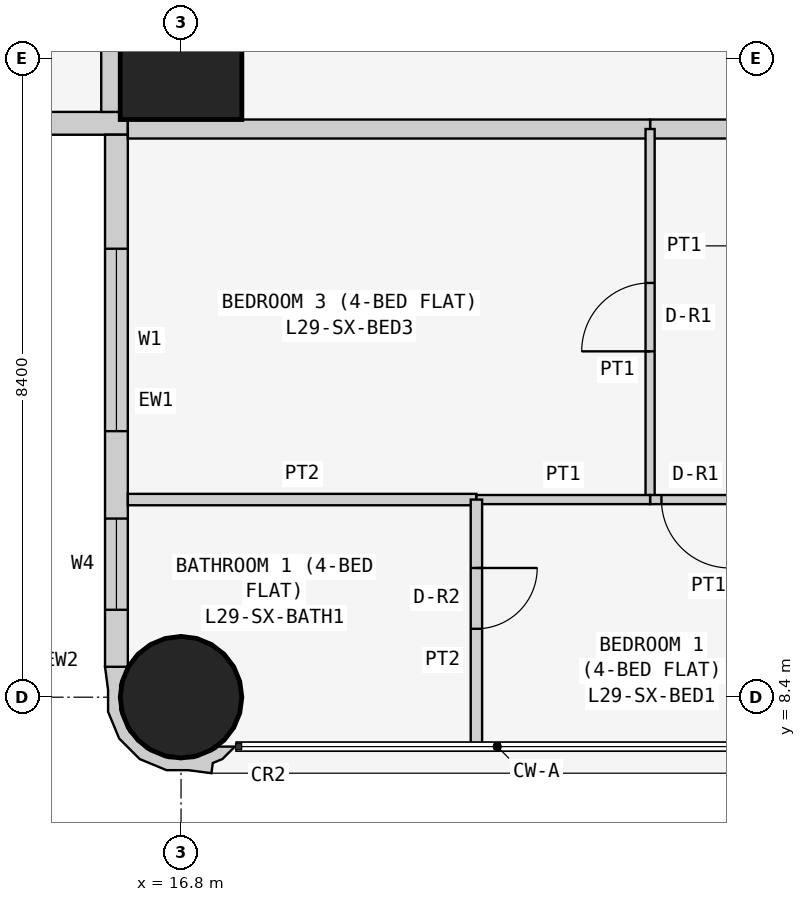
"""IFC4 building model, lengths in metres.
Left out: names, types, materials, properties, quantities, classifications, styles, units other than length and angle.
Written with IfcOpenShell. Run it as: python <this file> out.ifc"""

import sys

from ifc_helpers import new_model, si_unit, direction, frame, frame_2d, origin, origin_2d, place, context, subcontext, project, spatial, polyline, rectangle, circle, outline, extrude, element, fill, save


model = new_model("IFC4")
c1 = context("Model", 3, precision=1e-05, world=origin(), true_north=direction((0.0, 1.0)))
c2 = subcontext(c1, "Body", "Model", "MODEL_VIEW")
j1 = project(units=[si_unit("LENGTHUNIT", "METRE"), si_unit("PLANEANGLEUNIT", "RADIAN")], contexts=[c1])
p1 = place(None, origin())
s1 = spatial("IfcSite", under=j1, at=p1, CompositionType="ELEMENT")
p2 = place(p1, origin())
s2 = spatial("IfcBuilding", under=s1, at=p2, CompositionType="ELEMENT")
p3 = place(p2, frame((0.0, 0.0, 116.1)))
s3 = spatial("IfcBuildingStorey", under=s2, at=p3, CompositionType="ELEMENT", Elevation=116.1)
p4 = place(p3, frame((16.8, 8.4, 0.0), z_axis=(0.0, 0.0, 1.0), x_axis=(1.0, 0.0, 0.0)))
e1 = element("IfcColumn", 1, at=p4, inside=s3, PredefinedType="COLUMN", context=c2, shape_type="SweptSolid", body=[
    extrude(circle(Radius=0.8, at=origin_2d()), origin(), (0.0, 0.0, 1.0), 3.6),
])
p5 = place(p3, frame((16.8, 16.8, 0.0), z_axis=(0.0, 0.0, 1.0), x_axis=(1.0, 0.0, 0.0)))
e2 = element("IfcColumn", 2, at=p5, inside=s3, PredefinedType="COLUMN", context=c2, shape_type="SweptSolid", body=[
    extrude(rectangle(XDim=1.6, YDim=1.6, at=origin_2d()), origin(), (0.0, 0.0, 1.0), 3.6),
])
p6 = place(p3, frame((0.4, 15.95, 0.0), z_axis=(0.0, 0.0, 1.0), x_axis=(1.0, 0.0, 0.0)))
e3 = element("IfcWall", 3, at=p6, inside=s3, PredefinedType="SOLIDWALL", context=c2, shape_type="SweptSolid", body=[
    extrude(rectangle(XDim=15.7, YDim=0.3, at=frame_2d((7.85, 0.0))), origin(), (0.0, 0.0, 1.0), 3.45),
])
p7 = place(p6, frame((12.4, 0.0, 0.9)))
e4 = element("IfcOpeningElement", 4, at=p7, cuts=e3, PredefinedType="OPENING", context=c2, shape_type="SweptSolid", body=[
    extrude(rectangle(XDim=1.8, YDim=1.5, at=frame_2d((0.9, 0.75))), frame((0.0, 0.16, 0.0), z_axis=(0.0, -1.0, 0.0), x_axis=(1.0, 0.0, 0.0)), (0.0, 0.0, 1.0), 0.32),
])
p8 = place(p6, frame((9.55, 0.0, 1.5)))
e5 = element("IfcOpeningElement", 5, at=p8, cuts=e3, PredefinedType="OPENING", context=c2, shape_type="SweptSolid", body=[
    extrude(rectangle(XDim=0.9, YDim=0.7, at=frame_2d((0.45, 0.35))), frame((0.0, 0.16, 0.0), z_axis=(0.0, -1.0, 0.0), x_axis=(1.0, 0.0, 0.0)), (0.0, 0.0, 1.0), 0.32),
])
p9 = place(p6, frame((5.1, 0.0, 0.9)))
e6 = element("IfcOpeningElement", 6, at=p9, cuts=e3, PredefinedType="OPENING", context=c2, shape_type="SweptSolid", body=[
    extrude(rectangle(XDim=1.8, YDim=1.5, at=frame_2d((0.9, 0.75))), frame((0.0, 0.16, 0.0), z_axis=(0.0, -1.0, 0.0), x_axis=(1.0, 0.0, 0.0)), (0.0, 0.0, 1.0), 0.32),
])
p10 = place(p6, frame((2.0, 0.0, 0.0)))
e7 = element("IfcOpeningElement", 7, at=p10, cuts=e3, PredefinedType="OPENING", context=c2, shape_type="SweptSolid", body=[
    extrude(rectangle(XDim=0.9, YDim=2.4, at=frame_2d((0.45, 1.2))), frame((0.0, 0.16, 0.0), z_axis=(0.0, -1.0, 0.0), x_axis=(1.0, 0.0, 0.0)), (0.0, 0.0, 1.0), 0.32),
])
p11 = place(p6, frame((0.7, 0.0, 0.9)))
e8 = element("IfcOpeningElement", 8, at=p11, cuts=e3, PredefinedType="OPENING", context=c2, shape_type="SweptSolid", body=[
    extrude(rectangle(XDim=1.2, YDim=1.5, at=frame_2d((0.6, 0.75))), frame((0.0, 0.16, 0.0), z_axis=(0.0, -1.0, 0.0), x_axis=(1.0, 0.0, 0.0)), (0.0, 0.0, 1.0), 0.32),
])
p12 = place(p3, frame((15.95, 15.8, 0.0), z_axis=(0.0, 0.0, 1.0), x_axis=(0.0, -1.0, 0.0)))
e9 = element("IfcWall", 9, at=p12, inside=s3, PredefinedType="SOLIDWALL", context=c2, shape_type="SweptSolid", body=[
    extrude(rectangle(XDim=7.0, YDim=0.3, at=frame_2d((3.5, 0.0))), origin(), (0.0, 0.0, 1.0), 3.45),
])
p13 = place(p12, frame((1.5, 0.0, 0.9)))
e10 = element("IfcOpeningElement", 10, at=p13, cuts=e9, PredefinedType="OPENING", context=c2, shape_type="SweptSolid", body=[
    extrude(rectangle(XDim=2.4, YDim=1.5, at=frame_2d((1.2, 0.75))), frame((0.0, 0.16, 0.0), z_axis=(0.0, -1.0, 0.0), x_axis=(1.0, 0.0, 0.0)), (0.0, 0.0, 1.0), 0.32),
])
p14 = place(p12, frame((5.05, 0.0, 0.9)))
e11 = element("IfcOpeningElement", 11, at=p14, cuts=e9, PredefinedType="OPENING", context=c2, shape_type="SweptSolid", body=[
    extrude(rectangle(XDim=1.2, YDim=1.5, at=frame_2d((0.6, 0.75))), frame((0.0, 0.16, 0.0), z_axis=(0.0, -1.0, 0.0), x_axis=(1.0, 0.0, 0.0)), (0.0, 0.0, 1.0), 0.32),
])
p15 = place(p3, frame((15.983, 8.727, 0.0), z_axis=(0.0, 0.0, 1.0), x_axis=(-0.343276641956, -0.93923434088, 0.0)))
e12 = element("IfcWall", 12, at=p15, inside=s3, PredefinedType="SOLIDWALL", context=c2, shape_type="SweptSolid", body=[
    extrude(outline(polyline([(0.829, 1.599), (0.697, 1.569), (0.604, 1.67), (0.394, 1.767), (0.471, 1.556), (0.509, 1.539), (0.724, 1.304), (0.833, 1.005), (0.82, 0.686), (0.686, 0.397), (0.451, 0.182), (0.152, 0.073), (-0.116, 0.084), (-0.127, 0.078), (-0.146, 0.071), (-0.006, -0.197), (0.266, -0.055), (0.535, 0.044), (0.817, 0.302), (0.978, 0.648), (0.994, 1.03), (0.895, 1.3), (0.829, 1.599)])), origin(), (0.0, 0.0, 1.0), 3.45),
])
p16 = place(p3, frame((24.171, 15.875, 0.0), z_axis=(0.0, 0.0, 1.0), x_axis=(-1.0, 0.0, 0.0)))
e13 = element("IfcWall", 13, at=p16, inside=s3, PredefinedType="PARTITIONING", context=c2, shape_type="SweptSolid", body=[
    extrude(rectangle(XDim=1.2, YDim=0.25, at=frame_2d((0.6, 0.0))), origin(), (0.0, 0.0, 1.0), 3.45),
])
for number, where, z_axis, x_axis in (
    (14, (22.971, 15.875, 0.0), (0.0, 0.0, 1.0), (-1.0, 0.0, 0.0)),
    (15, (15.875, 16.1, 0.0), (0.0, 0.0, 1.0), (0.0, 1.0, 0.0)),
):
    element("IfcWall", number, at=place(p3, frame(where, z_axis=z_axis, x_axis=x_axis)), inside=s3, PredefinedType="PARTITIONING", context=c2, shape_type="SweptSolid", body=[
        extrude(rectangle(XDim=6.871, YDim=0.25, at=frame_2d((3.436, 0.0))), origin(), (0.0, 0.0, 1.0), 3.45),
    ])
p17 = place(p3, frame((22.971, 11.0, 0.0), z_axis=(0.0, 0.0, 1.0), x_axis=(0.0, 1.0, 0.0)))
e16 = element("IfcWall", 16, at=p17, inside=s3, PredefinedType="PARTITIONING", context=c2, shape_type="SweptSolid", body=[
    extrude(rectangle(XDim=4.875, YDim=0.12, at=frame_2d((2.438, 0.0))), origin(), (0.0, 0.0, 1.0), 3.45),
])
p18 = place(p17, frame((1.95, 0.0, 0.0)))
e17 = element("IfcOpeningElement", 17, at=p18, cuts=e16, PredefinedType="OPENING", context=c2, shape_type="SweptSolid", body=[
    extrude(rectangle(XDim=0.9, YDim=2.1, at=frame_2d((0.45, 1.05))), frame((0.0, 0.07, 0.0), z_axis=(0.0, -1.0, 0.0), x_axis=(1.0, 0.0, 0.0)), (0.0, 0.0, 1.0), 0.14),
])
p19 = place(p3, frame((24.171, 11.0, 0.0), z_axis=(0.0, 0.0, 1.0), x_axis=(-1.0, 0.0, 0.0)))
e18 = element("IfcWall", 18, at=p19, inside=s3, PredefinedType="PARTITIONING", context=c2, shape_type="SweptSolid", body=[
    extrude(rectangle(XDim=1.2, YDim=0.12, at=frame_2d((0.6, 0.0))), origin(), (0.0, 0.0, 1.0), 3.45),
])
p20 = place(p19, frame((0.151, 0.0, 0.0)))
e19 = element("IfcOpeningElement", 19, at=p20, cuts=e18, PredefinedType="OPENING", context=c2, shape_type="SweptSolid", body=[
    extrude(rectangle(XDim=0.9, YDim=2.1, at=frame_2d((0.45, 1.05))), frame((0.0, 0.07, 0.0), z_axis=(0.0, -1.0, 0.0), x_axis=(1.0, 0.0, 0.0)), (0.0, 0.0, 1.0), 0.14),
])
p21 = place(p3, frame((16.1, 11.0, 0.0), z_axis=(0.0, 0.0, 1.0), x_axis=(1.0, 0.0, 0.0)))
e20 = element("IfcWall", 20, at=p21, inside=s3, PredefinedType="PARTITIONING", context=c2, shape_type="SweptSolid", body=[
    extrude(rectangle(XDim=4.586, YDim=0.15, at=frame_2d((2.293, 0.0))), origin(), (0.0, 0.0, 1.0), 3.45),
])
p22 = place(p3, frame((20.686, 11.0, 0.0), z_axis=(0.0, 0.0, 1.0), x_axis=(1.0, 0.0, 0.0)))
e21 = element("IfcWall", 21, at=p22, inside=s3, PredefinedType="PARTITIONING", context=c2, shape_type="SweptSolid", body=[
    extrude(rectangle(XDim=2.285, YDim=0.12, at=frame_2d((1.143, 0.0))), origin(), (0.0, 0.0, 1.0), 3.45),
])
p23 = place(p3, frame((20.686, 7.75, 0.0), z_axis=(0.0, 0.0, 1.0), x_axis=(0.0, 1.0, 0.0)))
e22 = element("IfcWall", 22, at=p23, inside=s3, PredefinedType="PARTITIONING", context=c2, shape_type="SweptSolid", body=[
    extrude(rectangle(XDim=3.25, YDim=0.15, at=frame_2d((1.625, 0.0))), origin(), (0.0, 0.0, 1.0), 3.45),
])
p24 = place(p23, frame((1.55, 0.0, 0.0)))
e23 = element("IfcOpeningElement", 23, at=p24, cuts=e22, PredefinedType="OPENING", context=c2, shape_type="SweptSolid", body=[
    extrude(rectangle(XDim=0.8, YDim=2.1, at=frame_2d((0.4, 1.05))), frame((0.0, 0.085, 0.0), z_axis=(0.0, -1.0, 0.0), x_axis=(1.0, 0.0, 0.0)), (0.0, 0.0, 1.0), 0.17),
])
p25 = place(p13, origin())
e24 = element("IfcWindow", 24, at=p25, inside=s3, PartitioningType="SINGLE_PANEL", PredefinedType="WINDOW", context=c2, shape_type="SweptSolid", body=[
    extrude(rectangle(XDim=2.4, YDim=1.5, at=frame_2d((1.2, 0.75))), frame((0.0, 0.03, 0.0), z_axis=(0.0, -1.0, 0.0), x_axis=(1.0, 0.0, 0.0)), (0.0, 0.0, 1.0), 0.06),
])
fill(e10, e24)
p26 = place(p14, origin())
e25 = element("IfcWindow", 25, at=p26, inside=s3, PartitioningType="SINGLE_PANEL", PredefinedType="WINDOW", context=c2, shape_type="SweptSolid", body=[
    extrude(rectangle(XDim=1.2, YDim=1.5, at=frame_2d((0.6, 0.75))), frame((0.0, 0.03, 0.0), z_axis=(0.0, -1.0, 0.0), x_axis=(1.0, 0.0, 0.0)), (0.0, 0.0, 1.0), 0.06),
])
fill(e11, e25)
p27 = place(p18, origin())
e26 = element("IfcDoor", 26, at=p27, inside=s3, OperationType="SINGLE_SWING_LEFT", PredefinedType="DOOR", context=c2, shape_type="SweptSolid", body=[
    extrude(rectangle(XDim=0.9, YDim=2.1, at=frame_2d((0.45, 1.05))), frame((0.0, 0.025, 0.0), z_axis=(0.0, -1.0, 0.0), x_axis=(1.0, 0.0, 0.0)), (0.0, 0.0, 1.0), 0.05),
])
fill(e17, e26)
p28 = place(p20, origin())
e27 = element("IfcDoor", 27, at=p28, inside=s3, OperationType="SINGLE_SWING_LEFT", PredefinedType="DOOR", context=c2, shape_type="SweptSolid", body=[
    extrude(rectangle(XDim=0.9, YDim=2.1, at=frame_2d((0.45, 1.05))), frame((0.0, 0.025, 0.0), z_axis=(0.0, -1.0, 0.0), x_axis=(1.0, 0.0, 0.0)), (0.0, 0.0, 1.0), 0.05),
])
fill(e19, e27)
p29 = place(p24, frame((0.8, 0.0, 0.0), z_axis=(0.0, 0.0, 1.0), x_axis=(-1.0, 0.0, 0.0)))
e28 = element("IfcDoor", 28, at=p29, inside=s3, OperationType="SINGLE_SWING_LEFT", PredefinedType="DOOR", context=c2, shape_type="SweptSolid", body=[
    extrude(rectangle(XDim=0.8, YDim=2.1, at=frame_2d((0.4, 1.05))), frame((0.0, 0.025, 0.0), z_axis=(0.0, -1.0, 0.0), x_axis=(1.0, 0.0, 0.0)), (0.0, 0.0, 1.0), 0.05),
])
fill(e23, e28)
save(model, sys.argv[1])
